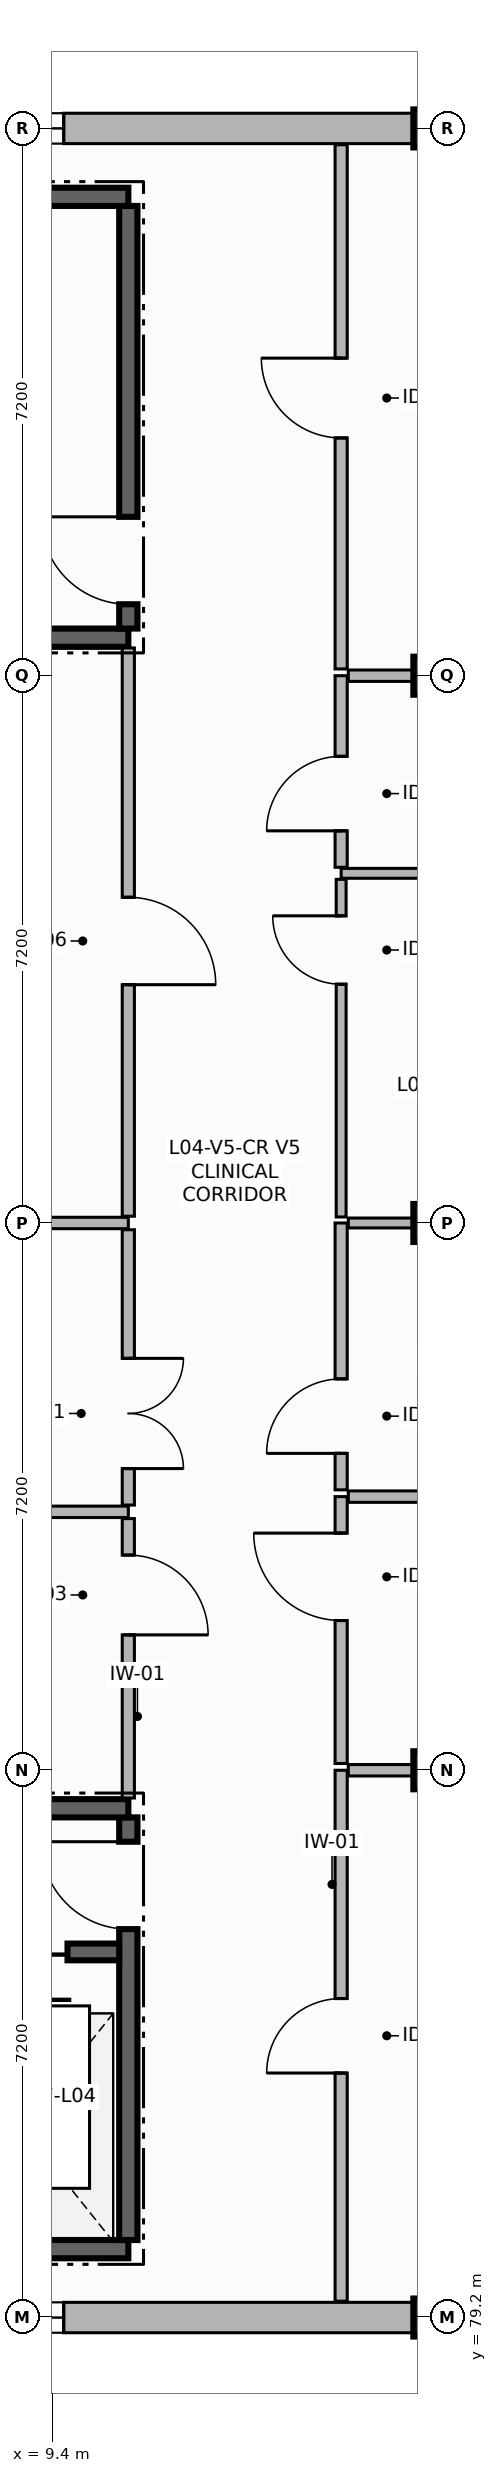
"""IFC4 building model, lengths in metres.
Left out: names, types, materials, properties, quantities, classifications, styles, units other than length and angle.
Written with IfcOpenShell. Run it as: python <this file> out.ifc"""

import sys

from ifc_helpers import new_model, si_unit, direction, frame, frame_2d, origin, origin_2d, place, context, subcontext, project, spatial, rectangle, extrude, element, fill, save


model = new_model("IFC4")
c1 = context("Model", 3, precision=1e-05, world=origin(), true_north=direction((0.0, 1.0)))
c2 = subcontext(c1, "Body", "Model", "MODEL_VIEW")
j1 = project(units=[si_unit("LENGTHUNIT", "METRE"), si_unit("PLANEANGLEUNIT", "RADIAN")], contexts=[c1])
p1 = place(None, origin())
s1 = spatial("IfcSite", under=j1, at=p1, CompositionType="ELEMENT")
p2 = place(p1, origin())
s2 = spatial("IfcBuilding", under=s1, at=p2, CompositionType="ELEMENT")
p3 = place(p2, frame((0.0, 0.0, 16.0)))
s3 = spatial("IfcBuildingStorey", under=s2, at=p3, CompositionType="ELEMENT", Elevation=16.0)
for number, where, z_axis, x_axis in (
    (1, (14.4, 79.2, 0.0), (0.0, 0.0, 1.0), (1.0, 0.0, 0.0)),
    (2, (14.4, 86.4, 0.0), (0.0, 0.0, 1.0), (1.0, 0.0, 0.0)),
    (3, (14.4, 93.6, 0.0), (0.0, 0.0, 1.0), (1.0, 0.0, 0.0)),
    (4, (14.4, 100.8, 0.0), (0.0, 0.0, 1.0), (1.0, 0.0, 0.0)),
    (5, (14.4, 108.0, 0.0), (0.0, 0.0, 1.0), (1.0, 0.0, 0.0)),
):
    element("IfcColumn", number, at=place(p3, frame(where, z_axis=z_axis, x_axis=x_axis)), inside=s3, PredefinedType="COLUMN", context=c2, shape_type="SweptSolid", body=[
        extrude(rectangle(XDim=0.5, YDim=0.5, at=origin_2d()), origin(), (0.0, 0.0, 1.0), 3.46),
    ])
p4 = place(p3, frame((7.2, 79.2, 0.0), z_axis=(0.0, 0.0, 1.0), x_axis=(1.0, 0.0, 0.0)))
e6 = element("IfcWall", 6, at=p4, inside=s3, PredefinedType="SOLIDWALL", context=c2, shape_type="SweptSolid", body=[
    extrude(rectangle(XDim=7.2, YDim=0.4, at=frame_2d((3.6, 0.0))), origin(), (0.0, 0.0, 1.0), 2.79),
])
p5 = place(p4, frame((0.85, 0.0, 0.9)))
e7 = element("IfcOpeningElement", 7, at=p5, cuts=e6, PredefinedType="OPENING", context=c2, shape_type="SweptSolid", body=[
    extrude(rectangle(XDim=1.5, YDim=1.6, at=frame_2d((0.75, 0.8))), frame((0.0, 0.21, 0.0), z_axis=(0.0, -1.0, 0.0), x_axis=(1.0, 0.0, 0.0)), (0.0, 0.0, 1.0), 0.42),
])
p6 = place(p3, frame((14.4, 108.0, 0.0), z_axis=(0.0, 0.0, 1.0), x_axis=(-1.0, 0.0, 0.0)))
e8 = element("IfcWall", 8, at=p6, inside=s3, PredefinedType="SOLIDWALL", context=c2, shape_type="SweptSolid", body=[
    extrude(rectangle(XDim=7.2, YDim=0.4, at=frame_2d((3.6, 0.0))), origin(), (0.0, 0.0, 1.0), 2.79),
])
p7 = place(p6, frame((4.85, 0.0, 0.9)))
e9 = element("IfcOpeningElement", 9, at=p7, cuts=e8, PredefinedType="OPENING", context=c2, shape_type="SweptSolid", body=[
    extrude(rectangle(XDim=1.5, YDim=1.6, at=frame_2d((0.75, 0.8))), frame((0.0, 0.21, 0.0), z_axis=(0.0, -1.0, 0.0), x_axis=(1.0, 0.0, 0.0)), (0.0, 0.0, 1.0), 0.42),
])
p8 = place(p3, frame((0.9, 80.1, 0.0), z_axis=(0.0, 0.0, 1.0), x_axis=(1.0, 0.0, 0.0)))
e10 = element("IfcWall", 10, at=p8, inside=s3, PredefinedType="SHEAR", context=c2, shape_type="SweptSolid", body=[
    extrude(rectangle(XDim=9.5, YDim=0.24, at=frame_2d((4.75, 0.0))), origin(), (0.0, 0.0, 1.0), 3.46),
])
p9 = place(p3, frame((10.4, 80.22, 0.0), z_axis=(0.0, 0.0, 1.0), x_axis=(0.0, 1.0, 0.0)))
e11 = element("IfcWall", 11, at=p9, inside=s3, PredefinedType="SHEAR", context=c2, shape_type="SweptSolid", body=[
    extrude(rectangle(XDim=5.56, YDim=0.24, at=frame_2d((2.78, 0.0))), origin(), (0.0, 0.0, 1.0), 3.46),
])
p10 = place(p9, frame((4.09, 0.0, 0.0)))
e12 = element("IfcOpeningElement", 12, at=p10, cuts=e11, PredefinedType="OPENING", context=c2, shape_type="SweptSolid", body=[
    extrude(rectangle(XDim=1.15, YDim=2.2, at=frame_2d((0.575, 1.1))), frame((0.0, 0.13, 0.0), z_axis=(0.0, -1.0, 0.0), x_axis=(1.0, 0.0, 0.0)), (0.0, 0.0, 1.0), 0.26),
])
p11 = place(p3, frame((10.4, 85.9, 0.0), z_axis=(0.0, 0.0, 1.0), x_axis=(-1.0, 0.0, 0.0)))
e13 = element("IfcWall", 13, at=p11, inside=s3, PredefinedType="SHEAR", context=c2, shape_type="SweptSolid", body=[
    extrude(rectangle(XDim=9.5, YDim=0.24, at=frame_2d((4.75, 0.0))), origin(), (0.0, 0.0, 1.0), 3.46),
])
p12 = place(p3, frame((1.02, 84.01, 0.0), z_axis=(0.0, 0.0, 1.0), x_axis=(1.0, 0.0, 0.0)))
e14 = element("IfcWall", 14, at=p12, inside=s3, PredefinedType="SHEAR", context=c2, shape_type="SweptSolid", body=[
    extrude(rectangle(XDim=9.26, YDim=0.22, at=frame_2d((4.63, 0.0))), origin(), (0.0, 0.0, 1.0), 3.46),
])
p13 = place(p12, frame((0.33, 0.0, 0.0)))
e15 = element("IfcOpeningElement", 15, at=p13, cuts=e14, PredefinedType="OPENING", context=c2, shape_type="SweptSolid", body=[
    extrude(rectangle(XDim=1.1, YDim=2.15, at=frame_2d((0.55, 1.075))), frame((0.0, 0.12, 0.0), z_axis=(0.0, -1.0, 0.0), x_axis=(1.0, 0.0, 0.0)), (0.0, 0.0, 1.0), 0.24),
])
p14 = place(p12, frame((7.38, 0.0, 0.0)))
e16 = element("IfcOpeningElement", 16, at=p14, cuts=e14, PredefinedType="OPENING", context=c2, shape_type="SweptSolid", body=[
    extrude(rectangle(XDim=1.2, YDim=2.2, at=frame_2d((0.6, 1.1))), frame((0.0, 0.12, 0.0), z_axis=(0.0, -1.0, 0.0), x_axis=(1.0, 0.0, 0.0)), (0.0, 0.0, 1.0), 0.24),
])
p15 = place(p3, frame((0.9, 101.3, 0.0), z_axis=(0.0, 0.0, 1.0), x_axis=(1.0, 0.0, 0.0)))
e17 = element("IfcWall", 17, at=p15, inside=s3, PredefinedType="SHEAR", context=c2, shape_type="SweptSolid", body=[
    extrude(rectangle(XDim=9.5, YDim=0.24, at=frame_2d((4.75, 0.0))), origin(), (0.0, 0.0, 1.0), 3.46),
])
p16 = place(p3, frame((10.4, 101.42, 0.0), z_axis=(0.0, 0.0, 1.0), x_axis=(0.0, 1.0, 0.0)))
e18 = element("IfcWall", 18, at=p16, inside=s3, PredefinedType="SHEAR", context=c2, shape_type="SweptSolid", body=[
    extrude(rectangle(XDim=5.56, YDim=0.24, at=frame_2d((2.78, 0.0))), origin(), (0.0, 0.0, 1.0), 3.46),
])
p17 = place(p16, frame((0.32, 0.0, 0.0)))
e19 = element("IfcOpeningElement", 19, at=p17, cuts=e18, PredefinedType="OPENING", context=c2, shape_type="SweptSolid", body=[
    extrude(rectangle(XDim=1.15, YDim=2.2, at=frame_2d((0.575, 1.1))), frame((0.0, 0.13, 0.0), z_axis=(0.0, -1.0, 0.0), x_axis=(1.0, 0.0, 0.0)), (0.0, 0.0, 1.0), 0.26),
])
p18 = place(p3, frame((10.4, 107.1, 0.0), z_axis=(0.0, 0.0, 1.0), x_axis=(-1.0, 0.0, 0.0)))
e20 = element("IfcWall", 20, at=p18, inside=s3, PredefinedType="SHEAR", context=c2, shape_type="SweptSolid", body=[
    extrude(rectangle(XDim=9.5, YDim=0.24, at=frame_2d((4.75, 0.0))), origin(), (0.0, 0.0, 1.0), 3.46),
])
p19 = place(p3, frame((0.215, 89.8, 0.0), z_axis=(0.0, 0.0, 1.0), x_axis=(1.0, 0.0, 0.0)))
e21 = element("IfcWall", 21, at=p19, inside=s3, PredefinedType="PARTITIONING", context=c2, shape_type="SweptSolid", body=[
    extrude(rectangle(XDim=10.185, YDim=0.15, at=frame_2d((5.092, 0.0))), origin(), (0.0, 0.0, 1.0), 2.78),
])
p20 = place(p3, frame((10.4, 89.711, 0.0), z_axis=(0.0, 0.0, 1.0), x_axis=(0.0, -1.0, 0.0)))
e22 = element("IfcWall", 22, at=p20, inside=s3, PredefinedType="PARTITIONING", context=c2, shape_type="SweptSolid", body=[
    extrude(rectangle(XDim=3.676, YDim=0.16, at=frame_2d((1.838, 0.0))), origin(), (0.0, 0.0, 1.0), 2.78),
])
p21 = place(p20, frame((0.48, 0.0, 0.0)))
e23 = element("IfcOpeningElement", 23, at=p21, cuts=e22, PredefinedType="OPENING", context=c2, shape_type="SweptSolid", body=[
    extrude(rectangle(XDim=1.05, YDim=2.15, at=frame_2d((0.525, 1.075))), frame((0.0, 0.09, 0.0), z_axis=(0.0, -1.0, 0.0), x_axis=(1.0, 0.0, 0.0)), (0.0, 0.0, 1.0), 0.18),
])
p22 = place(p3, frame((0.215, 93.6, 0.0), z_axis=(0.0, 0.0, 1.0), x_axis=(1.0, 0.0, 0.0)))
e24 = element("IfcWall", 24, at=p22, inside=s3, PredefinedType="PARTITIONING", context=c2, shape_type="SweptSolid", body=[
    extrude(rectangle(XDim=10.185, YDim=0.15, at=frame_2d((5.092, 0.0))), origin(), (0.0, 0.0, 1.0), 2.78),
])
p23 = place(p3, frame((10.4, 93.511, 0.0), z_axis=(0.0, 0.0, 1.0), x_axis=(0.0, -1.0, 0.0)))
e25 = element("IfcWall", 25, at=p23, inside=s3, PredefinedType="PARTITIONING", context=c2, shape_type="SweptSolid", body=[
    extrude(rectangle(XDim=3.622, YDim=0.16, at=frame_2d((1.811, 0.0))), origin(), (0.0, 0.0, 1.0), 2.78),
])
p24 = place(p23, frame((1.692, 0.0, 0.0)))
e26 = element("IfcOpeningElement", 26, at=p24, cuts=e25, PredefinedType="OPENING", context=c2, shape_type="SweptSolid", body=[
    extrude(rectangle(XDim=1.45, YDim=2.25, at=frame_2d((0.725, 1.125))), frame((0.0, 0.09, 0.0), z_axis=(0.0, -1.0, 0.0), x_axis=(1.0, 0.0, 0.0)), (0.0, 0.0, 1.0), 0.18),
])
p25 = place(p3, frame((10.4, 101.165, 0.0), z_axis=(0.0, 0.0, 1.0), x_axis=(0.0, -1.0, 0.0)))
e27 = element("IfcWall", 27, at=p25, inside=s3, PredefinedType="PARTITIONING", context=c2, shape_type="SweptSolid", body=[
    extrude(rectangle(XDim=7.476, YDim=0.16, at=frame_2d((3.738, 0.0))), origin(), (0.0, 0.0, 1.0), 2.78),
])
p26 = place(p25, frame((3.28, 0.0, 0.0)))
e28 = element("IfcOpeningElement", 28, at=p26, cuts=e27, PredefinedType="OPENING", context=c2, shape_type="SweptSolid", body=[
    extrude(rectangle(XDim=1.15, YDim=2.25, at=frame_2d((0.575, 1.125))), frame((0.0, 0.09, 0.0), z_axis=(0.0, -1.0, 0.0), x_axis=(1.0, 0.0, 0.0)), (0.0, 0.0, 1.0), 0.18),
])
p27 = place(p3, frame((13.2, 79.415, 0.0), z_axis=(0.0, 0.0, 1.0), x_axis=(0.0, 1.0, 0.0)))
e29 = element("IfcWall", 29, at=p27, inside=s3, PredefinedType="PARTITIONING", context=c2, shape_type="SweptSolid", body=[
    extrude(rectangle(XDim=6.985, YDim=0.16, at=frame_2d((3.492, 0.0))), origin(), (0.0, 0.0, 1.0), 2.78),
])
p28 = place(p27, frame((3.002, 0.0, 0.0)))
e30 = element("IfcOpeningElement", 30, at=p28, cuts=e29, PredefinedType="OPENING", context=c2, shape_type="SweptSolid", body=[
    extrude(rectangle(XDim=0.98, YDim=2.15, at=frame_2d((0.49, 1.075))), frame((0.0, 0.09, 0.0), z_axis=(0.0, -1.0, 0.0), x_axis=(1.0, 0.0, 0.0)), (0.0, 0.0, 1.0), 0.18),
])
p29 = place(p3, frame((13.294, 86.4, 0.0), z_axis=(0.0, 0.0, 1.0), x_axis=(1.0, 0.0, 0.0)))
e31 = element("IfcWall", 31, at=p29, inside=s3, PredefinedType="PARTITIONING", context=c2, shape_type="SweptSolid", body=[
    extrude(rectangle(XDim=8.091, YDim=0.15, at=frame_2d((4.045, 0.0))), origin(), (0.0, 0.0, 1.0), 2.78),
])
p30 = place(p3, frame((13.2, 86.489, 0.0), z_axis=(0.0, 0.0, 1.0), x_axis=(0.0, 1.0, 0.0)))
e32 = element("IfcWall", 32, at=p30, inside=s3, PredefinedType="PARTITIONING", context=c2, shape_type="SweptSolid", body=[
    extrude(rectangle(XDim=3.511, YDim=0.16, at=frame_2d((1.755, 0.0))), origin(), (0.0, 0.0, 1.0), 2.78),
])
p31 = place(p30, frame((1.881, 0.0, 0.0)))
e33 = element("IfcOpeningElement", 33, at=p31, cuts=e32, PredefinedType="OPENING", context=c2, shape_type="SweptSolid", body=[
    extrude(rectangle(XDim=1.15, YDim=2.25, at=frame_2d((0.575, 1.125))), frame((0.0, 0.09, 0.0), z_axis=(0.0, -1.0, 0.0), x_axis=(1.0, 0.0, 0.0)), (0.0, 0.0, 1.0), 0.18),
])
p32 = place(p3, frame((13.294, 90.0, 0.0), z_axis=(0.0, 0.0, 1.0), x_axis=(1.0, 0.0, 0.0)))
e34 = element("IfcWall", 34, at=p32, inside=s3, PredefinedType="PARTITIONING", context=c2, shape_type="SweptSolid", body=[
    extrude(rectangle(XDim=8.091, YDim=0.15, at=frame_2d((4.045, 0.0))), origin(), (0.0, 0.0, 1.0), 2.78),
])
p33 = place(p3, frame((13.2, 90.089, 0.0), z_axis=(0.0, 0.0, 1.0), x_axis=(0.0, 1.0, 0.0)))
e35 = element("IfcWall", 35, at=p33, inside=s3, PredefinedType="PARTITIONING", context=c2, shape_type="SweptSolid", body=[
    extrude(rectangle(XDim=3.511, YDim=0.16, at=frame_2d((1.755, 0.0))), origin(), (0.0, 0.0, 1.0), 2.78),
])
p34 = place(p33, frame((0.48, 0.0, 0.0)))
e36 = element("IfcOpeningElement", 36, at=p34, cuts=e35, PredefinedType="OPENING", context=c2, shape_type="SweptSolid", body=[
    extrude(rectangle(XDim=0.98, YDim=2.15, at=frame_2d((0.49, 1.075))), frame((0.0, 0.09, 0.0), z_axis=(0.0, -1.0, 0.0), x_axis=(1.0, 0.0, 0.0)), (0.0, 0.0, 1.0), 0.18),
])
p35 = place(p3, frame((13.294, 93.6, 0.0), z_axis=(0.0, 0.0, 1.0), x_axis=(1.0, 0.0, 0.0)))
e37 = element("IfcWall", 37, at=p35, inside=s3, PredefinedType="PARTITIONING", context=c2, shape_type="SweptSolid", body=[
    extrude(rectangle(XDim=3.506, YDim=0.13, at=frame_2d((1.753, 0.0))), origin(), (0.0, 0.0, 1.0), 2.78),
])
p36 = place(p3, frame((13.2, 98.2, 0.0), z_axis=(0.0, 0.0, 1.0), x_axis=(1.0, 0.0, 0.0)))
e38 = element("IfcWall", 38, at=p36, inside=s3, PredefinedType="PARTITIONING", context=c2, shape_type="SweptSolid", body=[
    extrude(rectangle(XDim=3.6, YDim=0.13, at=frame_2d((1.8, 0.0))), origin(), (0.0, 0.0, 1.0), 2.78),
])
p37 = place(p3, frame((13.2, 93.679, 0.0), z_axis=(0.0, 0.0, 1.0), x_axis=(0.0, 1.0, 0.0)))
e39 = element("IfcWall", 39, at=p37, inside=s3, PredefinedType="PARTITIONING", context=c2, shape_type="SweptSolid", body=[
    extrude(rectangle(XDim=4.442, YDim=0.13, at=frame_2d((2.221, 0.0))), origin(), (0.0, 0.0, 1.0), 2.78),
])
p38 = place(p37, frame((3.062, 0.0, 0.0)))
e40 = element("IfcOpeningElement", 40, at=p38, cuts=e39, PredefinedType="OPENING", context=c2, shape_type="SweptSolid", body=[
    extrude(rectangle(XDim=0.9, YDim=2.1, at=frame_2d((0.45, 1.05))), frame((0.0, 0.075, 0.0), z_axis=(0.0, -1.0, 0.0), x_axis=(1.0, 0.0, 0.0)), (0.0, 0.0, 1.0), 0.15),
])
p39 = place(p3, frame((13.2, 98.279, 0.0), z_axis=(0.0, 0.0, 1.0), x_axis=(0.0, 1.0, 0.0)))
e41 = element("IfcWall", 41, at=p39, inside=s3, PredefinedType="PARTITIONING", context=c2, shape_type="SweptSolid", body=[
    extrude(rectangle(XDim=2.521, YDim=0.16, at=frame_2d((1.26, 0.0))), origin(), (0.0, 0.0, 1.0), 2.78),
])
p40 = place(p39, frame((0.48, 0.0, 0.0)))
e42 = element("IfcOpeningElement", 42, at=p40, cuts=e41, PredefinedType="OPENING", context=c2, shape_type="SweptSolid", body=[
    extrude(rectangle(XDim=0.98, YDim=2.15, at=frame_2d((0.49, 1.075))), frame((0.0, 0.09, 0.0), z_axis=(0.0, -1.0, 0.0), x_axis=(1.0, 0.0, 0.0)), (0.0, 0.0, 1.0), 0.18),
])
p41 = place(p3, frame((13.294, 100.8, 0.0), z_axis=(0.0, 0.0, 1.0), x_axis=(1.0, 0.0, 0.0)))
e43 = element("IfcWall", 43, at=p41, inside=s3, PredefinedType="PARTITIONING", context=c2, shape_type="SweptSolid", body=[
    extrude(rectangle(XDim=8.091, YDim=0.15, at=frame_2d((4.045, 0.0))), origin(), (0.0, 0.0, 1.0), 2.78),
])
p42 = place(p3, frame((13.2, 100.889, 0.0), z_axis=(0.0, 0.0, 1.0), x_axis=(0.0, 1.0, 0.0)))
e44 = element("IfcWall", 44, at=p42, inside=s3, PredefinedType="PARTITIONING", context=c2, shape_type="SweptSolid", body=[
    extrude(rectangle(XDim=6.896, YDim=0.16, at=frame_2d((3.448, 0.0))), origin(), (0.0, 0.0, 1.0), 2.78),
])
p43 = place(p42, frame((3.039, 0.0, 0.0)))
e45 = element("IfcOpeningElement", 45, at=p43, cuts=e44, PredefinedType="OPENING", context=c2, shape_type="SweptSolid", body=[
    extrude(rectangle(XDim=1.05, YDim=2.15, at=frame_2d((0.525, 1.075))), frame((0.0, 0.09, 0.0), z_axis=(0.0, -1.0, 0.0), x_axis=(1.0, 0.0, 0.0)), (0.0, 0.0, 1.0), 0.18),
])
p44 = place(p5, origin())
e46 = element("IfcWindow", 46, at=p44, inside=s3, PartitioningType="SINGLE_PANEL", PredefinedType="WINDOW", context=c2, shape_type="SweptSolid", body=[
    extrude(rectangle(XDim=1.5, YDim=1.6, at=frame_2d((0.75, 0.8))), frame((0.0, 0.03, 0.0), z_axis=(0.0, -1.0, 0.0), x_axis=(1.0, 0.0, 0.0)), (0.0, 0.0, 1.0), 0.06),
])
fill(e7, e46)
p45 = place(p7, origin())
e47 = element("IfcWindow", 47, at=p45, inside=s3, PartitioningType="SINGLE_PANEL", PredefinedType="WINDOW", context=c2, shape_type="SweptSolid", body=[
    extrude(rectangle(XDim=1.5, YDim=1.6, at=frame_2d((0.75, 0.8))), frame((0.0, 0.03, 0.0), z_axis=(0.0, -1.0, 0.0), x_axis=(1.0, 0.0, 0.0)), (0.0, 0.0, 1.0), 0.06),
])
fill(e9, e47)
p46 = place(p14, origin())
e48 = element("IfcDoor", 48, at=p46, inside=s3, OperationType="DOUBLE_DOOR_SLIDING", PredefinedType="DOOR", context=c2, shape_type="SweptSolid", body=[
    extrude(rectangle(XDim=1.2, YDim=2.2, at=frame_2d((0.6, 1.1))), frame((0.0, 0.025, 0.0), z_axis=(0.0, -1.0, 0.0), x_axis=(1.0, 0.0, 0.0)), (0.0, 0.0, 1.0), 0.05),
])
fill(e16, e48)
p47 = place(p10, origin())
e49 = element("IfcDoor", 49, at=p47, inside=s3, OperationType="SINGLE_SWING_RIGHT", PredefinedType="DOOR", context=c2, shape_type="SweptSolid", body=[
    extrude(rectangle(XDim=1.15, YDim=2.2, at=frame_2d((0.575, 1.1))), frame((0.0, 0.025, 0.0), z_axis=(0.0, -1.0, 0.0), x_axis=(1.0, 0.0, 0.0)), (0.0, 0.0, 1.0), 0.05),
])
fill(e12, e49)
p48 = place(p17, origin())
e50 = element("IfcDoor", 50, at=p48, inside=s3, OperationType="SINGLE_SWING_RIGHT", PredefinedType="DOOR", context=c2, shape_type="SweptSolid", body=[
    extrude(rectangle(XDim=1.15, YDim=2.2, at=frame_2d((0.575, 1.1))), frame((0.0, 0.025, 0.0), z_axis=(0.0, -1.0, 0.0), x_axis=(1.0, 0.0, 0.0)), (0.0, 0.0, 1.0), 0.05),
])
fill(e19, e50)
p49 = place(p21, origin())
e51 = element("IfcDoor", 51, at=p49, inside=s3, OperationType="SINGLE_SWING_RIGHT", PredefinedType="DOOR", context=c2, shape_type="SweptSolid", body=[
    extrude(rectangle(XDim=1.05, YDim=2.15, at=frame_2d((0.525, 1.075))), frame((0.0, 0.025, 0.0), z_axis=(0.0, -1.0, 0.0), x_axis=(1.0, 0.0, 0.0)), (0.0, 0.0, 1.0), 0.05),
])
fill(e23, e51)
p50 = place(p24, origin())
e52 = element("IfcDoor", 52, at=p50, inside=s3, OperationType="DOUBLE_DOOR_SINGLE_SWING", PredefinedType="DOOR", context=c2, shape_type="SweptSolid", body=[
    extrude(rectangle(XDim=1.45, YDim=2.25, at=frame_2d((0.725, 1.125))), frame((0.0, 0.025, 0.0), z_axis=(0.0, -1.0, 0.0), x_axis=(1.0, 0.0, 0.0)), (0.0, 0.0, 1.0), 0.05),
])
fill(e26, e52)
p51 = place(p26, origin())
e53 = element("IfcDoor", 53, at=p51, inside=s3, OperationType="SINGLE_SWING_RIGHT", PredefinedType="DOOR", context=c2, shape_type="SweptSolid", body=[
    extrude(rectangle(XDim=1.15, YDim=2.25, at=frame_2d((0.575, 1.125))), frame((0.0, 0.025, 0.0), z_axis=(0.0, -1.0, 0.0), x_axis=(1.0, 0.0, 0.0)), (0.0, 0.0, 1.0), 0.05),
])
fill(e28, e53)
p52 = place(p28, origin())
e54 = element("IfcDoor", 54, at=p52, inside=s3, OperationType="SINGLE_SWING_LEFT", PredefinedType="DOOR", context=c2, shape_type="SweptSolid", body=[
    extrude(rectangle(XDim=0.98, YDim=2.15, at=frame_2d((0.49, 1.075))), frame((0.0, 0.025, 0.0), z_axis=(0.0, -1.0, 0.0), x_axis=(1.0, 0.0, 0.0)), (0.0, 0.0, 1.0), 0.05),
])
fill(e30, e54)
p53 = place(p31, origin())
e55 = element("IfcDoor", 55, at=p53, inside=s3, OperationType="SINGLE_SWING_RIGHT", PredefinedType="DOOR", context=c2, shape_type="SweptSolid", body=[
    extrude(rectangle(XDim=1.15, YDim=2.25, at=frame_2d((0.575, 1.125))), frame((0.0, 0.025, 0.0), z_axis=(0.0, -1.0, 0.0), x_axis=(1.0, 0.0, 0.0)), (0.0, 0.0, 1.0), 0.05),
])
fill(e33, e55)
p54 = place(p34, origin())
e56 = element("IfcDoor", 56, at=p54, inside=s3, OperationType="SINGLE_SWING_LEFT", PredefinedType="DOOR", context=c2, shape_type="SweptSolid", body=[
    extrude(rectangle(XDim=0.98, YDim=2.15, at=frame_2d((0.49, 1.075))), frame((0.0, 0.025, 0.0), z_axis=(0.0, -1.0, 0.0), x_axis=(1.0, 0.0, 0.0)), (0.0, 0.0, 1.0), 0.05),
])
fill(e36, e56)
p55 = place(p38, origin())
e57 = element("IfcDoor", 57, at=p55, inside=s3, OperationType="SINGLE_SWING_RIGHT", PredefinedType="DOOR", context=c2, shape_type="SweptSolid", body=[
    extrude(rectangle(XDim=0.9, YDim=2.1, at=frame_2d((0.45, 1.05))), frame((0.0, 0.025, 0.0), z_axis=(0.0, -1.0, 0.0), x_axis=(1.0, 0.0, 0.0)), (0.0, 0.0, 1.0), 0.05),
])
fill(e40, e57)
p56 = place(p40, origin())
e58 = element("IfcDoor", 58, at=p56, inside=s3, OperationType="SINGLE_SWING_LEFT", PredefinedType="DOOR", context=c2, shape_type="SweptSolid", body=[
    extrude(rectangle(XDim=0.98, YDim=2.15, at=frame_2d((0.49, 1.075))), frame((0.0, 0.025, 0.0), z_axis=(0.0, -1.0, 0.0), x_axis=(1.0, 0.0, 0.0)), (0.0, 0.0, 1.0), 0.05),
])
fill(e42, e58)
p57 = place(p43, origin())
e59 = element("IfcDoor", 59, at=p57, inside=s3, OperationType="SINGLE_SWING_RIGHT", PredefinedType="DOOR", context=c2, shape_type="SweptSolid", body=[
    extrude(rectangle(XDim=1.05, YDim=2.15, at=frame_2d((0.525, 1.075))), frame((0.0, 0.025, 0.0), z_axis=(0.0, -1.0, 0.0), x_axis=(1.0, 0.0, 0.0)), (0.0, 0.0, 1.0), 0.05),
])
fill(e45, e59)
save(model, sys.argv[1])
